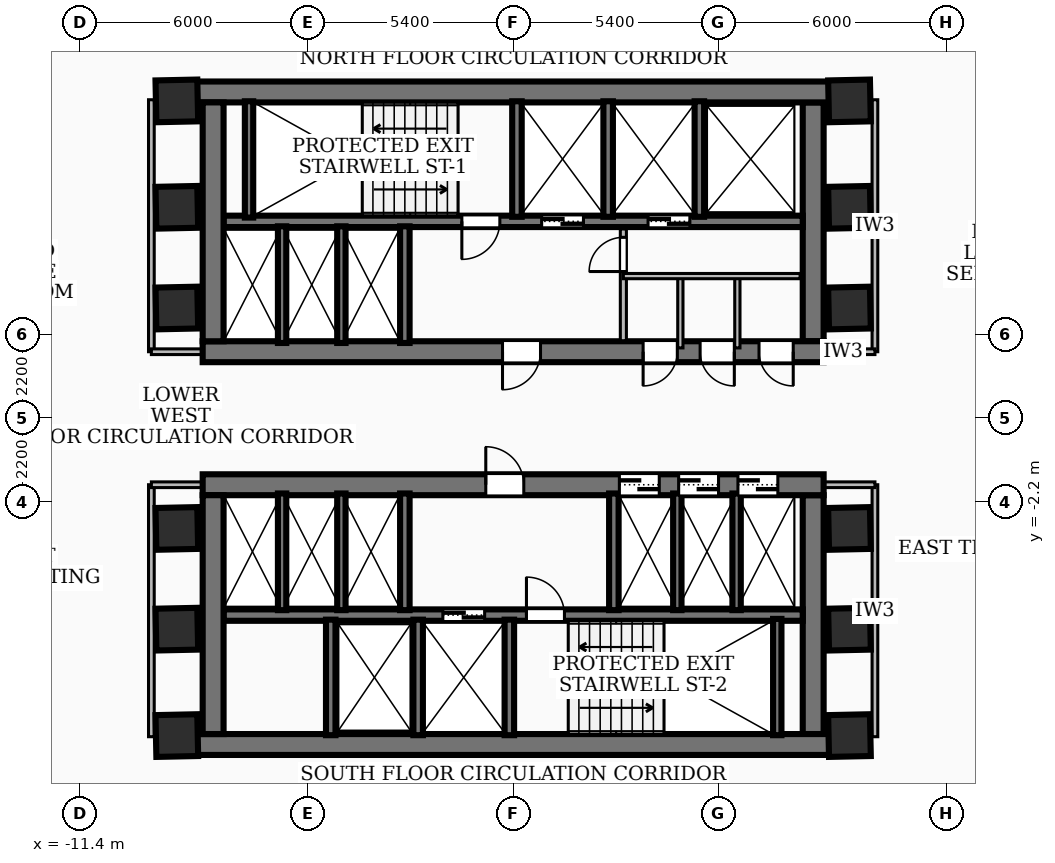
"""IFC4 building model, lengths in metres.
Left out: names, types, materials, properties, quantities, classifications, styles, units other than length and angle.
Written with IfcOpenShell. Run it as: python <this file> out.ifc"""

import sys

from ifc_helpers import new_model, si_unit, direction, frame, frame_2d, origin, origin_2d, place, context, subcontext, project, spatial, rectangle, extrude, element, fill, save


model = new_model("IFC4")
c1 = context("Model", 3, precision=1e-05, world=origin(), true_north=direction((0.0, 1.0)))
c2 = subcontext(c1, "Body", "Model", "MODEL_VIEW")
j1 = project(units=[si_unit("LENGTHUNIT", "METRE"), si_unit("PLANEANGLEUNIT", "RADIAN")], contexts=[c1])
p1 = place(None, origin())
s1 = spatial("IfcSite", under=j1, at=p1, CompositionType="ELEMENT")
p2 = place(p1, origin())
s2 = spatial("IfcBuilding", under=s1, at=p2, CompositionType="ELEMENT")
p3 = place(p2, frame((0.0, 0.0, 38.88)))
s3 = spatial("IfcBuildingStorey", under=s2, at=p3, CompositionType="ELEMENT", Elevation=38.88)
p4 = place(p3, frame((-8.78, 8.585, 0.0), z_axis=(0.0, 0.0, 1.0), x_axis=(1.0, 0.0, 0.0)))
e1 = element("IfcWall", 1, at=p4, inside=s3, PredefinedType="SHEAR", context=c2, shape_type="SweptSolid", body=[
    extrude(rectangle(XDim=17.56, YDim=0.55, at=frame_2d((8.78, 0.0))), origin(), (0.0, 0.0, 1.0), 3.34),
])
p5 = place(p3, frame((8.17, 1.75, 0.0), z_axis=(0.0, 0.0, 1.0), x_axis=(-1.0, 0.0, 0.0)))
e2 = element("IfcWall", 2, at=p5, inside=s3, PredefinedType="SHEAR", context=c2, shape_type="SweptSolid", body=[
    extrude(rectangle(XDim=16.34, YDim=0.55, at=frame_2d((8.17, 0.0))), origin(), (0.0, 0.0, 1.0), 3.34),
])
p6 = place(p5, frame((7.45, 0.0, 0.0)))
e3 = element("IfcOpeningElement", 3, at=p6, cuts=e2, PredefinedType="OPENING", context=c2, shape_type="SweptSolid", body=[
    extrude(rectangle(XDim=1.0, YDim=2.1, at=frame_2d((0.5, 1.05))), frame((0.0, 0.285, 0.0), z_axis=(0.0, -1.0, 0.0), x_axis=(1.0, 0.0, 0.0)), (0.0, 0.0, 1.0), 0.57),
])
p7 = place(p5, frame((3.85, 0.0, 0.0)))
e4 = element("IfcOpeningElement", 4, at=p7, cuts=e2, PredefinedType="OPENING", context=c2, shape_type="SweptSolid", body=[
    extrude(rectangle(XDim=0.9, YDim=2.06, at=frame_2d((0.45, 1.03))), frame((0.0, 0.285, 0.0), z_axis=(0.0, -1.0, 0.0), x_axis=(1.0, 0.0, 0.0)), (0.0, 0.0, 1.0), 0.57),
])
p8 = place(p5, frame((2.35, 0.0, 0.0)))
e5 = element("IfcOpeningElement", 5, at=p8, cuts=e2, PredefinedType="OPENING", context=c2, shape_type="SweptSolid", body=[
    extrude(rectangle(XDim=0.9, YDim=2.06, at=frame_2d((0.45, 1.03))), frame((0.0, 0.285, 0.0), z_axis=(0.0, -1.0, 0.0), x_axis=(1.0, 0.0, 0.0)), (0.0, 0.0, 1.0), 0.57),
])
p9 = place(p5, frame((0.8, 0.0, 0.0)))
e6 = element("IfcOpeningElement", 6, at=p9, cuts=e2, PredefinedType="OPENING", context=c2, shape_type="SweptSolid", body=[
    extrude(rectangle(XDim=0.9, YDim=2.06, at=frame_2d((0.45, 1.03))), frame((0.0, 0.285, 0.0), z_axis=(0.0, -1.0, 0.0), x_axis=(1.0, 0.0, 0.0)), (0.0, 0.0, 1.0), 0.57),
])
for number, where, z_axis, x_axis in (
    (7, (-7.895, 2.025, 0.0), (0.0, 0.0, 1.0), (0.0, 1.0, 0.0)),
    (8, (7.895, 8.31, 0.0), (0.0, 0.0, 1.0), (0.0, -1.0, 0.0)),
):
    element("IfcWall", number, at=place(p3, frame(where, z_axis=z_axis, x_axis=x_axis)), inside=s3, PredefinedType="SHEAR", context=c2, shape_type="SweptSolid", body=[
        extrude(rectangle(XDim=6.285, YDim=0.55, at=frame_2d((3.143, 0.0))), origin(), (0.0, 0.0, 1.0), 3.34),
    ])
p10 = place(p3, frame((7.62, 5.18, 0.0), z_axis=(0.0, 0.0, 1.0), x_axis=(-1.0, 0.0, 0.0)))
e9 = element("IfcWall", 9, at=p10, inside=s3, PredefinedType="SOLIDWALL", context=c2, shape_type="SweptSolid", body=[
    extrude(rectangle(XDim=15.24, YDim=0.3, at=frame_2d((7.62, 0.0))), origin(), (0.0, 0.0, 1.0), 3.34),
])
p11 = place(p10, frame((5.77, 0.0, 0.0)))
e10 = element("IfcOpeningElement", 10, at=p11, cuts=e9, PredefinedType="OPENING", context=c2, shape_type="SweptSolid", body=[
    extrude(rectangle(XDim=1.1, YDim=2.15, at=frame_2d((0.55, 1.075))), frame((0.0, 0.16, 0.0), z_axis=(0.0, -1.0, 0.0), x_axis=(1.0, 0.0, 0.0)), (0.0, 0.0, 1.0), 0.32),
])
p12 = place(p10, frame((2.97, 0.0, 0.0)))
e11 = element("IfcOpeningElement", 11, at=p12, cuts=e9, PredefinedType="OPENING", context=c2, shape_type="SweptSolid", body=[
    extrude(rectangle(XDim=1.1, YDim=2.15, at=frame_2d((0.55, 1.075))), frame((0.0, 0.16, 0.0), z_axis=(0.0, -1.0, 0.0), x_axis=(1.0, 0.0, 0.0)), (0.0, 0.0, 1.0), 0.32),
])
p13 = place(p10, frame((7.97, 0.0, 0.0)))
e12 = element("IfcOpeningElement", 12, at=p13, cuts=e9, PredefinedType="OPENING", context=c2, shape_type="SweptSolid", body=[
    extrude(rectangle(XDim=1.0, YDim=2.1, at=frame_2d((0.5, 1.05))), frame((0.0, 0.16, 0.0), z_axis=(0.0, -1.0, 0.0), x_axis=(1.0, 0.0, 0.0)), (0.0, 0.0, 1.0), 0.32),
])
p14 = place(p3, frame((8.78, -8.585, 0.0), z_axis=(0.0, 0.0, 1.0), x_axis=(-1.0, 0.0, 0.0)))
e13 = element("IfcWall", 13, at=p14, inside=s3, PredefinedType="SHEAR", context=c2, shape_type="SweptSolid", body=[
    extrude(rectangle(XDim=17.56, YDim=0.55, at=frame_2d((8.78, 0.0))), origin(), (0.0, 0.0, 1.0), 3.34),
])
p15 = place(p3, frame((-8.17, -1.75, 0.0), z_axis=(0.0, 0.0, 1.0), x_axis=(1.0, 0.0, 0.0)))
e14 = element("IfcWall", 14, at=p15, inside=s3, PredefinedType="SHEAR", context=c2, shape_type="SweptSolid", body=[
    extrude(rectangle(XDim=16.34, YDim=0.55, at=frame_2d((8.17, 0.0))), origin(), (0.0, 0.0, 1.0), 3.34),
])
p16 = place(p15, frame((7.45, 0.0, 0.0)))
e15 = element("IfcOpeningElement", 15, at=p16, cuts=e14, PredefinedType="OPENING", context=c2, shape_type="SweptSolid", body=[
    extrude(rectangle(XDim=1.0, YDim=2.1, at=frame_2d((0.5, 1.05))), frame((0.0, 0.285, 0.0), z_axis=(0.0, -1.0, 0.0), x_axis=(1.0, 0.0, 0.0)), (0.0, 0.0, 1.0), 0.57),
])
p17 = place(p15, frame((10.965, 0.0, 0.0)))
e16 = element("IfcOpeningElement", 16, at=p17, cuts=e14, PredefinedType="OPENING", context=c2, shape_type="SweptSolid", body=[
    extrude(rectangle(XDim=1.05, YDim=2.15, at=frame_2d((0.525, 1.075))), frame((0.0, 0.285, 0.0), z_axis=(0.0, -1.0, 0.0), x_axis=(1.0, 0.0, 0.0)), (0.0, 0.0, 1.0), 0.57),
])
p18 = place(p15, frame((12.525, 0.0, 0.0)))
e17 = element("IfcOpeningElement", 17, at=p18, cuts=e14, PredefinedType="OPENING", context=c2, shape_type="SweptSolid", body=[
    extrude(rectangle(XDim=1.05, YDim=2.15, at=frame_2d((0.525, 1.075))), frame((0.0, 0.285, 0.0), z_axis=(0.0, -1.0, 0.0), x_axis=(1.0, 0.0, 0.0)), (0.0, 0.0, 1.0), 0.57),
])
p19 = place(p15, frame((14.085, 0.0, 0.0)))
e18 = element("IfcOpeningElement", 18, at=p19, cuts=e14, PredefinedType="OPENING", context=c2, shape_type="SweptSolid", body=[
    extrude(rectangle(XDim=1.05, YDim=2.15, at=frame_2d((0.525, 1.075))), frame((0.0, 0.285, 0.0), z_axis=(0.0, -1.0, 0.0), x_axis=(1.0, 0.0, 0.0)), (0.0, 0.0, 1.0), 0.57),
])
for number, where, z_axis, x_axis in (
    (19, (-7.895, -8.31, 0.0), (0.0, 0.0, 1.0), (0.0, 1.0, 0.0)),
    (20, (7.895, -2.025, 0.0), (0.0, 0.0, 1.0), (0.0, -1.0, 0.0)),
):
    element("IfcWall", number, at=place(p3, frame(where, z_axis=z_axis, x_axis=x_axis)), inside=s3, PredefinedType="SHEAR", context=c2, shape_type="SweptSolid", body=[
        extrude(rectangle(XDim=6.285, YDim=0.55, at=frame_2d((3.143, 0.0))), origin(), (0.0, 0.0, 1.0), 3.34),
    ])
p20 = place(p3, frame((-7.62, -5.18, 0.0), z_axis=(0.0, 0.0, 1.0), x_axis=(1.0, 0.0, 0.0)))
e21 = element("IfcWall", 21, at=p20, inside=s3, PredefinedType="SOLIDWALL", context=c2, shape_type="SweptSolid", body=[
    extrude(rectangle(XDim=15.24, YDim=0.3, at=frame_2d((7.62, 0.0))), origin(), (0.0, 0.0, 1.0), 3.34),
])
p21 = place(p20, frame((5.77, 0.0, 0.0)))
e22 = element("IfcOpeningElement", 22, at=p21, cuts=e21, PredefinedType="OPENING", context=c2, shape_type="SweptSolid", body=[
    extrude(rectangle(XDim=1.1, YDim=2.15, at=frame_2d((0.55, 1.075))), frame((0.0, 0.16, 0.0), z_axis=(0.0, -1.0, 0.0), x_axis=(1.0, 0.0, 0.0)), (0.0, 0.0, 1.0), 0.32),
])
p22 = place(p20, frame((7.97, 0.0, 0.0)))
e23 = element("IfcOpeningElement", 23, at=p22, cuts=e21, PredefinedType="OPENING", context=c2, shape_type="SweptSolid", body=[
    extrude(rectangle(XDim=1.0, YDim=2.1, at=frame_2d((0.5, 1.05))), frame((0.0, 0.16, 0.0), z_axis=(0.0, -1.0, 0.0), x_axis=(1.0, 0.0, 0.0)), (0.0, 0.0, 1.0), 0.32),
])
for number, where, z_axis, x_axis in (
    (24, (-6.95, 5.28, 0.0), (0.0, 0.0, 1.0), (0.0, 1.0, 0.0)),
    (25, (6.95, -8.34, 0.0), (0.0, 0.0, 1.0), (0.0, 1.0, 0.0)),
):
    element("IfcWall", number, at=place(p3, frame(where, z_axis=z_axis, x_axis=x_axis)), inside=s3, PredefinedType="SOLIDWALL", context=c2, shape_type="SweptSolid", body=[
        extrude(rectangle(XDim=3.06, YDim=0.22, at=frame_2d((1.53, 0.0))), origin(), (0.0, 0.0, 1.0), 3.34),
    ])
for number, where, z_axis, x_axis in (
    (26, (0.1, 5.3, 0.0), (0.0, 0.0, 1.0), (0.0, 1.0, 0.0)),
    (27, (2.5, 5.3, 0.0), (0.0, 0.0, 1.0), (0.0, 1.0, 0.0)),
    (28, (4.9, 5.3, 0.0), (0.0, 0.0, 1.0), (0.0, 1.0, 0.0)),
):
    element("IfcWall", number, at=place(p3, frame(where, z_axis=z_axis, x_axis=x_axis)), inside=s3, PredefinedType="SOLIDWALL", context=c2, shape_type="SweptSolid", body=[
        extrude(rectangle(XDim=3.04, YDim=0.25, at=frame_2d((1.52, 0.0))), origin(), (0.0, 0.0, 1.0), 3.34),
    ])
p23 = place(p3, frame((-2.85, 1.98, 0.0), z_axis=(0.0, 0.0, 1.0), x_axis=(0.0, 1.0, 0.0)))
e29 = element("IfcWall", 29, at=p23, inside=s3, PredefinedType="SOLIDWALL", context=c2, shape_type="SweptSolid", body=[
    extrude(rectangle(XDim=3.07, YDim=0.25, at=frame_2d((1.535, 0.0))), origin(), (0.0, 0.0, 1.0), 3.34),
])
for number, where, z_axis, x_axis in (
    (30, (-0.1, -8.34, 0.0), (0.0, 0.0, 1.0), (0.0, 1.0, 0.0)),
    (31, (-2.5, -8.34, 0.0), (0.0, 0.0, 1.0), (0.0, 1.0, 0.0)),
    (32, (-4.8, -8.34, 0.0), (0.0, 0.0, 1.0), (0.0, 1.0, 0.0)),
):
    element("IfcWall", number, at=place(p3, frame(where, z_axis=z_axis, x_axis=x_axis)), inside=s3, PredefinedType="SOLIDWALL", context=c2, shape_type="SweptSolid", body=[
        extrude(rectangle(XDim=3.04, YDim=0.25, at=frame_2d((1.52, 0.0))), origin(), (0.0, 0.0, 1.0), 3.34),
    ])
for number, where, z_axis, x_axis in (
    (33, (-2.85, -5.05, 0.0), (0.0, 0.0, 1.0), (0.0, 1.0, 0.0)),
    (34, (2.65, -5.05, 0.0), (0.0, 0.0, 1.0), (0.0, 1.0, 0.0)),
):
    element("IfcWall", number, at=place(p3, frame(where, z_axis=z_axis, x_axis=x_axis)), inside=s3, PredefinedType="SOLIDWALL", context=c2, shape_type="SweptSolid", body=[
        extrude(rectangle(XDim=3.07, YDim=0.25, at=frame_2d((1.535, 0.0))), origin(), (0.0, 0.0, 1.0), 3.34),
    ])
for number, where, z_axis, x_axis in (
    (35, (-6.08, 1.98, 0.0), (0.0, 0.0, 1.0), (0.0, 1.0, 0.0)),
    (36, (-4.52, 1.98, 0.0), (0.0, 0.0, 1.0), (0.0, 1.0, 0.0)),
    (37, (4.32, -5.05, 0.0), (0.0, 0.0, 1.0), (0.0, 1.0, 0.0)),
    (38, (5.88, -5.05, 0.0), (0.0, 0.0, 1.0), (0.0, 1.0, 0.0)),
    (39, (-6.08, -5.05, 0.0), (0.0, 0.0, 1.0), (0.0, 1.0, 0.0)),
    (40, (-4.52, -5.05, 0.0), (0.0, 0.0, 1.0), (0.0, 1.0, 0.0)),
):
    element("IfcWall", number, at=place(p3, frame(where, z_axis=z_axis, x_axis=x_axis)), inside=s3, PredefinedType="SOLIDWALL", context=c2, shape_type="SweptSolid", body=[
        extrude(rectangle(XDim=3.07, YDim=0.22, at=frame_2d((1.535, 0.0))), origin(), (0.0, 0.0, 1.0), 3.34),
    ])
for number, where, z_axis, x_axis in (
    (41, (-8.85, -5.55, 0.0), (0.0, 0.0, 1.0), (1.0, 0.021, 0.0)),
    (42, (-8.85, -2.9, 0.0), (0.0, 0.0, 1.0), (1.0, 0.021, 0.0)),
    (43, (-8.85, 2.9, 0.0), (0.0, 0.0, 1.0), (1.0, 0.021, 0.0)),
    (44, (-8.85, 5.55, 0.0), (0.0, 0.0, 1.0), (1.0, 0.021, 0.0)),
    (45, (8.85, -5.55, 0.0), (0.0, 0.0, 1.0), (1.0, 0.021, 0.0)),
    (46, (8.85, -2.9, 0.0), (0.0, 0.0, 1.0), (1.0, 0.021, 0.0)),
    (47, (8.85, 2.9, 0.0), (0.0, 0.0, 1.0), (1.0, 0.021, 0.0)),
    (48, (8.85, 5.55, 0.0), (0.0, 0.0, 1.0), (1.0, 0.021, 0.0)),
    (49, (-8.85, 8.35, 0.0), (0.0, 0.0, 1.0), (1.0, 0.021, 0.0)),
    (50, (8.85, -8.35, 0.0), (0.0, 0.0, 1.0), (1.0, 0.021, 0.0)),
    (51, (8.85, 8.35, 0.0), (0.0, 0.0, 1.0), (1.0, 0.021, 0.0)),
    (52, (-8.85, -8.35, 0.0), (0.0, 0.0, 1.0), (1.0, 0.021, 0.0)),
):
    element("IfcColumn", number, at=place(p3, frame(where, z_axis=z_axis, x_axis=x_axis)), inside=s3, PredefinedType="COLUMN", context=c2, shape_type="SweptSolid", body=[
        extrude(rectangle(XDim=1.1, YDim=1.1, at=origin_2d()), origin(), (0.0, 0.0, 1.0), 3.6),
    ])
p24 = place(p3, frame((2.9, 2.04, 0.0), z_axis=(0.0, 0.0, 1.0), x_axis=(0.0, 1.0, 0.0)))
e53 = element("IfcWall", 53, at=p24, inside=s3, PredefinedType="PARTITIONING", context=c2, shape_type="SweptSolid", body=[
    extrude(rectangle(XDim=2.94, YDim=0.16, at=frame_2d((1.47, 0.0))), origin(), (0.0, 0.0, 1.0), 2.405),
])
p25 = place(p24, frame((1.82, 0.0, 0.0)))
e54 = element("IfcOpeningElement", 54, at=p25, cuts=e53, PredefinedType="OPENING", context=c2, shape_type="SweptSolid", body=[
    extrude(rectangle(XDim=0.9, YDim=2.06, at=frame_2d((0.45, 1.03))), frame((0.0, 0.09, 0.0), z_axis=(0.0, -1.0, 0.0), x_axis=(1.0, 0.0, 0.0)), (0.0, 0.0, 1.0), 0.18),
])
p26 = place(p3, frame((2.9, 3.74, 0.0), z_axis=(0.0, 0.0, 1.0), x_axis=(1.0, 0.0, 0.0)))
e55 = element("IfcWall", 55, at=p26, inside=s3, PredefinedType="PARTITIONING", context=c2, shape_type="SweptSolid", body=[
    extrude(rectangle(XDim=4.65, YDim=0.138, at=frame_2d((2.325, 0.0))), origin(), (0.0, 0.0, 1.0), 3.34),
])
for number, where, z_axis, x_axis in (
    (56, (4.4, 1.85, 0.0), (0.0, 0.0, 1.0), (0.0, 1.0, 0.0)),
    (57, (5.9, 1.85, 0.0), (0.0, 0.0, 1.0), (0.0, 1.0, 0.0)),
):
    element("IfcWall", number, at=place(p3, frame(where, z_axis=z_axis, x_axis=x_axis)), inside=s3, PredefinedType="PARTITIONING", context=c2, shape_type="SweptSolid", body=[
        extrude(rectangle(XDim=1.89, YDim=0.138, at=frame_2d((0.945, 0.0))), origin(), (0.0, 0.0, 1.0), 2.405),
    ])
p27 = place(p3, frame((-9.52, 1.75, 0.0), z_axis=(0.0, 0.0, 1.0), x_axis=(0.0, 1.0, 0.0)))
e58 = element("IfcWall", 58, at=p27, inside=s3, PredefinedType="PARTITIONING", context=c2, shape_type="SweptSolid", body=[
    extrude(rectangle(XDim=6.63, YDim=0.15, at=frame_2d((3.315, 0.0))), origin(), (0.0, 0.0, 1.0), 2.421),
])
p28 = place(p3, frame((-7.85, 1.75, 0.0), z_axis=(0.0, 0.0, 1.0), x_axis=(-1.0, 0.0, 0.0)))
e59 = element("IfcWall", 59, at=p28, inside=s3, PredefinedType="PARTITIONING", context=c2, shape_type="SweptSolid", body=[
    extrude(rectangle(XDim=1.67, YDim=0.15, at=frame_2d((0.835, 0.0))), origin(), (0.0, 0.0, 1.0), 2.405),
])
p29 = place(p3, frame((-9.52, -8.38, 0.0), z_axis=(0.0, 0.0, 1.0), x_axis=(0.0, 1.0, 0.0)))
e60 = element("IfcWall", 60, at=p29, inside=s3, PredefinedType="PARTITIONING", context=c2, shape_type="SweptSolid", body=[
    extrude(rectangle(XDim=6.63, YDim=0.15, at=frame_2d((3.315, 0.0))), origin(), (0.0, 0.0, 1.0), 2.421),
])
p30 = place(p3, frame((-7.85, -1.75, 0.0), z_axis=(0.0, 0.0, 1.0), x_axis=(-1.0, 0.0, 0.0)))
e61 = element("IfcWall", 61, at=p30, inside=s3, PredefinedType="PARTITIONING", context=c2, shape_type="SweptSolid", body=[
    extrude(rectangle(XDim=1.67, YDim=0.15, at=frame_2d((0.835, 0.0))), origin(), (0.0, 0.0, 1.0), 2.405),
])
p31 = place(p3, frame((9.52, 1.75, 0.0), z_axis=(0.0, 0.0, 1.0), x_axis=(0.0, 1.0, 0.0)))
e62 = element("IfcWall", 62, at=p31, inside=s3, PredefinedType="PARTITIONING", context=c2, shape_type="SweptSolid", body=[
    extrude(rectangle(XDim=6.63, YDim=0.15, at=frame_2d((3.315, 0.0))), origin(), (0.0, 0.0, 1.0), 2.421),
])
p32 = place(p3, frame((7.85, 1.75, 0.0), z_axis=(0.0, 0.0, 1.0), x_axis=(1.0, 0.0, 0.0)))
e63 = element("IfcWall", 63, at=p32, inside=s3, PredefinedType="PARTITIONING", context=c2, shape_type="SweptSolid", body=[
    extrude(rectangle(XDim=1.67, YDim=0.15, at=frame_2d((0.835, 0.0))), origin(), (0.0, 0.0, 1.0), 2.405),
])
p33 = place(p3, frame((9.52, -8.38, 0.0), z_axis=(0.0, 0.0, 1.0), x_axis=(0.0, 1.0, 0.0)))
e64 = element("IfcWall", 64, at=p33, inside=s3, PredefinedType="PARTITIONING", context=c2, shape_type="SweptSolid", body=[
    extrude(rectangle(XDim=6.63, YDim=0.15, at=frame_2d((3.315, 0.0))), origin(), (0.0, 0.0, 1.0), 2.421),
])
p34 = place(p3, frame((7.85, -1.75, 0.0), z_axis=(0.0, 0.0, 1.0), x_axis=(1.0, 0.0, 0.0)))
e65 = element("IfcWall", 65, at=p34, inside=s3, PredefinedType="PARTITIONING", context=c2, shape_type="SweptSolid", body=[
    extrude(rectangle(XDim=1.67, YDim=0.15, at=frame_2d((0.835, 0.0))), origin(), (0.0, 0.0, 1.0), 2.405),
])
p35 = place(p6, origin())
e66 = element("IfcDoor", 66, at=p35, inside=s3, OperationType="SINGLE_SWING_RIGHT", PredefinedType="DOOR", context=c2, shape_type="SweptSolid", body=[
    extrude(rectangle(XDim=1.0, YDim=2.1, at=frame_2d((0.5, 1.05))), frame((0.0, 0.025, 0.0), z_axis=(0.0, -1.0, 0.0), x_axis=(1.0, 0.0, 0.0)), (0.0, 0.0, 1.0), 0.05),
])
fill(e3, e66)
p36 = place(p16, origin())
e67 = element("IfcDoor", 67, at=p36, inside=s3, OperationType="SINGLE_SWING_LEFT", PredefinedType="DOOR", context=c2, shape_type="SweptSolid", body=[
    extrude(rectangle(XDim=1.0, YDim=2.1, at=frame_2d((0.5, 1.05))), frame((0.0, 0.025, 0.0), z_axis=(0.0, -1.0, 0.0), x_axis=(1.0, 0.0, 0.0)), (0.0, 0.0, 1.0), 0.05),
])
fill(e15, e67)
p37 = place(p11, origin())
e68 = element("IfcDoor", 68, at=p37, inside=s3, OperationType="DOUBLE_DOOR_SLIDING", PredefinedType="DOOR", context=c2, shape_type="SweptSolid", body=[
    extrude(rectangle(XDim=1.1, YDim=2.15, at=frame_2d((0.55, 1.075))), frame((0.0, 0.025, 0.0), z_axis=(0.0, -1.0, 0.0), x_axis=(1.0, 0.0, 0.0)), (0.0, 0.0, 1.0), 0.05),
])
fill(e10, e68)
p38 = place(p12, origin())
e69 = element("IfcDoor", 69, at=p38, inside=s3, OperationType="DOUBLE_DOOR_SLIDING", PredefinedType="DOOR", context=c2, shape_type="SweptSolid", body=[
    extrude(rectangle(XDim=1.1, YDim=2.15, at=frame_2d((0.55, 1.075))), frame((0.0, 0.025, 0.0), z_axis=(0.0, -1.0, 0.0), x_axis=(1.0, 0.0, 0.0)), (0.0, 0.0, 1.0), 0.05),
])
fill(e11, e69)
p39 = place(p13, origin())
e70 = element("IfcDoor", 70, at=p39, inside=s3, OperationType="SINGLE_SWING_RIGHT", PredefinedType="DOOR", context=c2, shape_type="SweptSolid", body=[
    extrude(rectangle(XDim=1.0, YDim=2.1, at=frame_2d((0.5, 1.05))), frame((0.0, 0.025, 0.0), z_axis=(0.0, -1.0, 0.0), x_axis=(1.0, 0.0, 0.0)), (0.0, 0.0, 1.0), 0.05),
])
fill(e12, e70)
p40 = place(p21, origin())
e71 = element("IfcDoor", 71, at=p40, inside=s3, OperationType="DOUBLE_DOOR_SLIDING", PredefinedType="DOOR", context=c2, shape_type="SweptSolid", body=[
    extrude(rectangle(XDim=1.1, YDim=2.15, at=frame_2d((0.55, 1.075))), frame((0.0, 0.025, 0.0), z_axis=(0.0, -1.0, 0.0), x_axis=(1.0, 0.0, 0.0)), (0.0, 0.0, 1.0), 0.05),
])
fill(e22, e71)
p41 = place(p22, origin())
e72 = element("IfcDoor", 72, at=p41, inside=s3, OperationType="SINGLE_SWING_LEFT", PredefinedType="DOOR", context=c2, shape_type="SweptSolid", body=[
    extrude(rectangle(XDim=1.0, YDim=2.1, at=frame_2d((0.5, 1.05))), frame((0.0, 0.025, 0.0), z_axis=(0.0, -1.0, 0.0), x_axis=(1.0, 0.0, 0.0)), (0.0, 0.0, 1.0), 0.05),
])
fill(e23, e72)
p42 = place(p17, origin())
e73 = element("IfcDoor", 73, at=p42, inside=s3, OperationType="DOUBLE_DOOR_SLIDING", PredefinedType="DOOR", context=c2, shape_type="SweptSolid", body=[
    extrude(rectangle(XDim=1.05, YDim=2.15, at=frame_2d((0.525, 1.075))), frame((0.0, 0.025, 0.0), z_axis=(0.0, -1.0, 0.0), x_axis=(1.0, 0.0, 0.0)), (0.0, 0.0, 1.0), 0.05),
])
fill(e16, e73)
p43 = place(p18, origin())
e74 = element("IfcDoor", 74, at=p43, inside=s3, OperationType="DOUBLE_DOOR_SLIDING", PredefinedType="DOOR", context=c2, shape_type="SweptSolid", body=[
    extrude(rectangle(XDim=1.05, YDim=2.15, at=frame_2d((0.525, 1.075))), frame((0.0, 0.025, 0.0), z_axis=(0.0, -1.0, 0.0), x_axis=(1.0, 0.0, 0.0)), (0.0, 0.0, 1.0), 0.05),
])
fill(e17, e74)
p44 = place(p19, origin())
e75 = element("IfcDoor", 75, at=p44, inside=s3, OperationType="DOUBLE_DOOR_SLIDING", PredefinedType="DOOR", context=c2, shape_type="SweptSolid", body=[
    extrude(rectangle(XDim=1.05, YDim=2.15, at=frame_2d((0.525, 1.075))), frame((0.0, 0.025, 0.0), z_axis=(0.0, -1.0, 0.0), x_axis=(1.0, 0.0, 0.0)), (0.0, 0.0, 1.0), 0.05),
])
fill(e18, e75)
p45 = place(p7, origin())
e76 = element("IfcDoor", 76, at=p45, inside=s3, OperationType="SINGLE_SWING_RIGHT", PredefinedType="DOOR", context=c2, shape_type="SweptSolid", body=[
    extrude(rectangle(XDim=0.9, YDim=2.06, at=frame_2d((0.45, 1.03))), frame((0.0, 0.025, 0.0), z_axis=(0.0, -1.0, 0.0), x_axis=(1.0, 0.0, 0.0)), (0.0, 0.0, 1.0), 0.05),
])
fill(e4, e76)
p46 = place(p8, origin())
e77 = element("IfcDoor", 77, at=p46, inside=s3, OperationType="SINGLE_SWING_LEFT", PredefinedType="DOOR", context=c2, shape_type="SweptSolid", body=[
    extrude(rectangle(XDim=0.9, YDim=2.06, at=frame_2d((0.45, 1.03))), frame((0.0, 0.025, 0.0), z_axis=(0.0, -1.0, 0.0), x_axis=(1.0, 0.0, 0.0)), (0.0, 0.0, 1.0), 0.05),
])
fill(e5, e77)
p47 = place(p9, origin())
e78 = element("IfcDoor", 78, at=p47, inside=s3, OperationType="SINGLE_SWING_LEFT", PredefinedType="DOOR", context=c2, shape_type="SweptSolid", body=[
    extrude(rectangle(XDim=0.9, YDim=2.06, at=frame_2d((0.45, 1.03))), frame((0.0, 0.025, 0.0), z_axis=(0.0, -1.0, 0.0), x_axis=(1.0, 0.0, 0.0)), (0.0, 0.0, 1.0), 0.05),
])
fill(e6, e78)
p48 = place(p25, origin())
e79 = element("IfcDoor", 79, at=p48, inside=s3, OperationType="SINGLE_SWING_LEFT", PredefinedType="DOOR", context=c2, shape_type="SweptSolid", body=[
    extrude(rectangle(XDim=0.9, YDim=2.06, at=frame_2d((0.45, 1.03))), frame((0.0, 0.025, 0.0), z_axis=(0.0, -1.0, 0.0), x_axis=(1.0, 0.0, 0.0)), (0.0, 0.0, 1.0), 0.05),
])
fill(e54, e79)
save(model, sys.argv[1])
